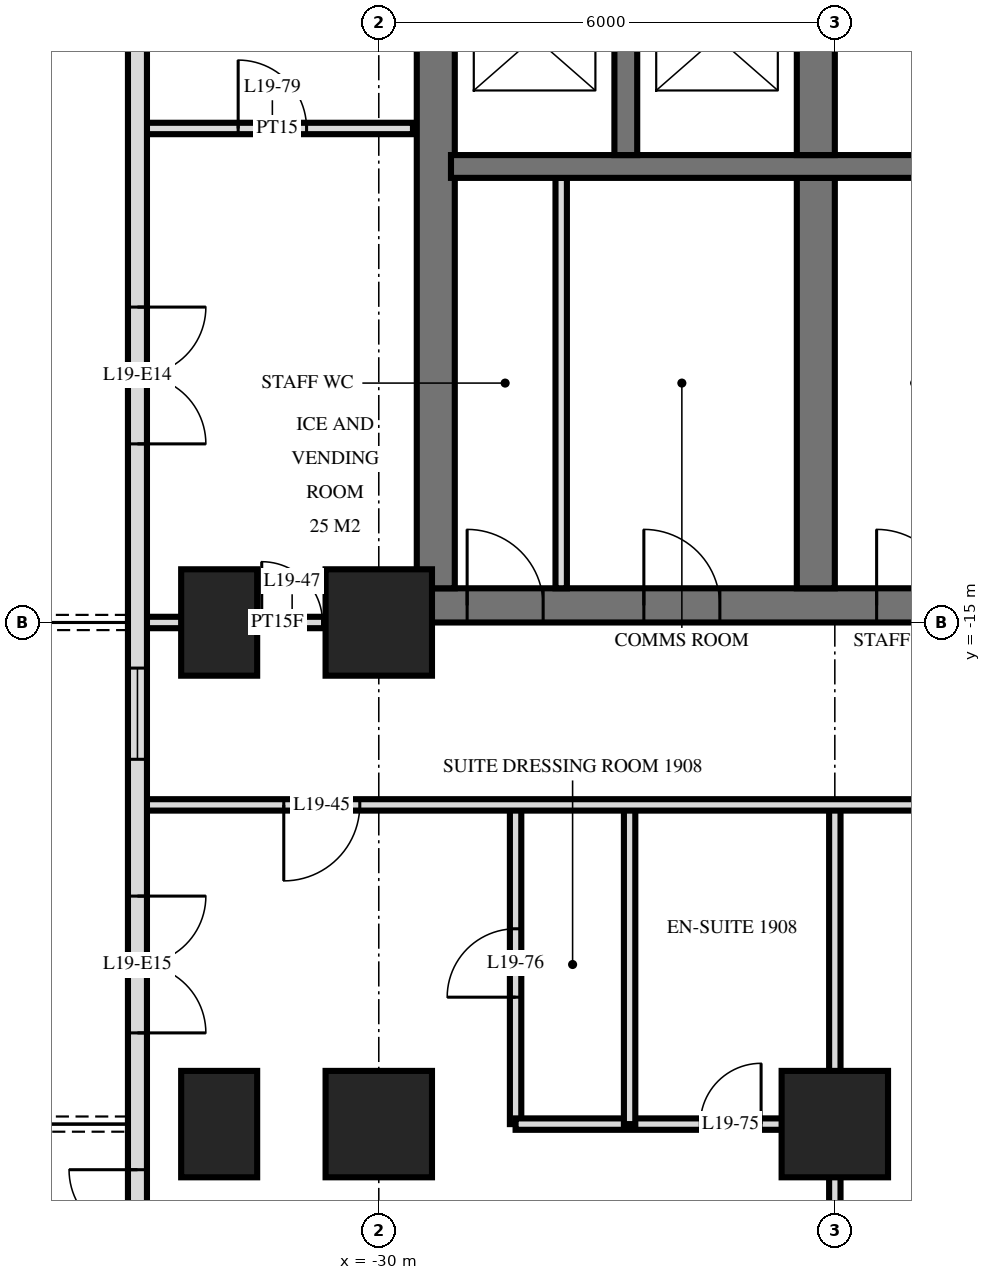
"""IFC4 building model, lengths in metres.
Left out: names, types, materials, properties, quantities, classifications, styles, units other than length and angle.
Written with IfcOpenShell. Run it as: python <this file> out.ifc"""

import sys

from ifc_helpers import new_model, si_unit, direction, frame, frame_2d, origin, origin_2d, place, context, subcontext, project, spatial, rectangle, extrude, element, fill, save


model = new_model("IFC4")
c1 = context("Model", 3, precision=1e-05, world=origin(), true_north=direction((0.0, 1.0)))
c2 = subcontext(c1, "Body", "Model", "MODEL_VIEW")
j1 = project(units=[si_unit("LENGTHUNIT", "METRE"), si_unit("PLANEANGLEUNIT", "RADIAN")], contexts=[c1])
p1 = place(None, origin())
s1 = spatial("IfcSite", under=j1, at=p1, CompositionType="ELEMENT")
p2 = place(p1, origin())
s2 = spatial("IfcBuilding", under=s1, at=p2, CompositionType="ELEMENT")
p3 = place(p2, frame((0.0, 0.0, 78.0)))
s3 = spatial("IfcBuildingStorey", under=s2, at=p3, CompositionType="ELEMENT", Elevation=78.0)
for number, where, z_axis, x_axis in (
    (1, (-32.1, -21.6, 0.0), (0.0, 0.0, 1.0), (0.0, 1.0, 0.0)),
    (2, (-32.1, -15.0, 0.0), (0.0, 0.0, 1.0), (0.0, 1.0, 0.0)),
):
    element("IfcColumn", number, at=place(p3, frame(where, z_axis=z_axis, x_axis=x_axis)), inside=s3, PredefinedType="COLUMN", context=c2, shape_type="SweptSolid", body=[
        extrude(rectangle(XDim=1.4, YDim=1.0, at=origin_2d()), origin(), (0.0, 0.0, 1.0), 3.6),
    ])
for number, where, z_axis, x_axis in (
    (3, (-30.0, -21.6, 0.0), (0.0, 0.0, 1.0), (1.0, 0.0, 0.0)),
    (4, (-30.0, -15.0, 0.0), (0.0, 0.0, 1.0), (1.0, 0.0, 0.0)),
    (5, (-24.0, -21.6, 0.0), (0.0, 0.0, 1.0), (1.0, 0.0, 0.0)),
):
    element("IfcColumn", number, at=place(p3, frame(where, z_axis=z_axis, x_axis=x_axis)), inside=s3, PredefinedType="COLUMN", context=c2, shape_type="SweptSolid", body=[
        extrude(rectangle(XDim=1.4, YDim=1.4, at=origin_2d()), origin(), (0.0, 0.0, 1.0), 3.6),
    ])
p4 = place(p3, frame((-29.5, -14.775, 0.0), z_axis=(0.0, 0.0, 1.0), x_axis=(1.0, 0.0, 0.0)))
e6 = element("IfcWall", 6, at=p4, inside=s3, PredefinedType="SHEAR", context=c2, shape_type="SweptSolid", body=[
    extrude(rectangle(XDim=19.5, YDim=0.45, at=frame_2d((9.75, 0.0))), origin(), (0.0, 0.0, 1.0), 3.6),
])
p5 = place(p4, frame((11.2, 0.0, 0.0)))
e7 = element("IfcOpeningElement", 7, at=p5, cuts=e6, PredefinedType="OPENING", context=c2, shape_type="SweptSolid", body=[
    extrude(rectangle(XDim=1.2, YDim=2.1, at=frame_2d((0.6, 1.05))), frame((0.0, 0.235, 0.0), z_axis=(0.0, -1.0, 0.0), x_axis=(1.0, 0.0, 0.0)), (0.0, 0.0, 1.0), 0.47),
])
p6 = place(p4, frame((14.25, 0.0, 0.0)))
e8 = element("IfcOpeningElement", 8, at=p6, cuts=e6, PredefinedType="OPENING", context=c2, shape_type="SweptSolid", body=[
    extrude(rectangle(XDim=1.1, YDim=2.1, at=frame_2d((0.55, 1.05))), frame((0.0, 0.235, 0.0), z_axis=(0.0, -1.0, 0.0), x_axis=(1.0, 0.0, 0.0)), (0.0, 0.0, 1.0), 0.47),
])
p7 = place(p4, frame((8.5, 0.0, 0.0)))
e9 = element("IfcOpeningElement", 9, at=p7, cuts=e6, PredefinedType="OPENING", context=c2, shape_type="SweptSolid", body=[
    extrude(rectangle(XDim=0.9, YDim=2.1, at=frame_2d((0.45, 1.05))), frame((0.0, 0.235, 0.0), z_axis=(0.0, -1.0, 0.0), x_axis=(1.0, 0.0, 0.0)), (0.0, 0.0, 1.0), 0.47),
])
p8 = place(p4, frame((6.05, 0.0, 0.0)))
e10 = element("IfcOpeningElement", 10, at=p8, cuts=e6, PredefinedType="OPENING", context=c2, shape_type="SweptSolid", body=[
    extrude(rectangle(XDim=1.0, YDim=2.1, at=frame_2d((0.5, 1.05))), frame((0.0, 0.235, 0.0), z_axis=(0.0, -1.0, 0.0), x_axis=(1.0, 0.0, 0.0)), (0.0, 0.0, 1.0), 0.47),
])
p9 = place(p4, frame((2.988, 0.0, 0.0)))
e11 = element("IfcOpeningElement", 11, at=p9, cuts=e6, PredefinedType="OPENING", context=c2, shape_type="SweptSolid", body=[
    extrude(rectangle(XDim=1.0, YDim=2.1, at=frame_2d((0.5, 1.05))), frame((0.0, 0.235, 0.0), z_axis=(0.0, -1.0, 0.0), x_axis=(1.0, 0.0, 0.0)), (0.0, 0.0, 1.0), 0.47),
])
p10 = place(p4, frame((0.663, 0.0, 0.0)))
e12 = element("IfcOpeningElement", 12, at=p10, cuts=e6, PredefinedType="OPENING", context=c2, shape_type="SweptSolid", body=[
    extrude(rectangle(XDim=1.0, YDim=2.1, at=frame_2d((0.5, 1.05))), frame((0.0, 0.235, 0.0), z_axis=(0.0, -1.0, 0.0), x_axis=(1.0, 0.0, 0.0)), (0.0, 0.0, 1.0), 0.47),
])
p11 = place(p3, frame((-29.25, -14.55, 0.0), z_axis=(0.0, 0.0, 1.0), x_axis=(0.0, 1.0, 0.0)))
e13 = element("IfcWall", 13, at=p11, inside=s3, PredefinedType="SHEAR", context=c2, shape_type="SweptSolid", body=[
    extrude(rectangle(XDim=14.1, YDim=0.5, at=frame_2d((7.05, 0.0))), origin(), (0.0, 0.0, 1.0), 3.6),
])
p12 = place(p3, frame((-29.05, -9.0, 0.0), z_axis=(0.0, 0.0, 1.0), x_axis=(1.0, 0.0, 0.0)))
e14 = element("IfcWall", 14, at=p12, inside=s3, PredefinedType="SHEAR", context=c2, shape_type="SweptSolid", body=[
    extrude(rectangle(XDim=18.7, YDim=0.3, at=frame_2d((9.35, 0.0))), origin(), (0.0, 0.0, 1.0), 3.6),
])
p13 = place(p12, frame((13.8, 0.0, 0.0)))
e15 = element("IfcOpeningElement", 15, at=p13, cuts=e14, PredefinedType="OPENING", context=c2, shape_type="SweptSolid", body=[
    extrude(rectangle(XDim=1.1, YDim=2.1, at=frame_2d((0.55, 1.05))), frame((0.0, 0.16, 0.0), z_axis=(0.0, -1.0, 0.0), x_axis=(1.0, 0.0, 0.0)), (0.0, 0.0, 1.0), 0.32),
])
p14 = place(p3, frame((-24.25, -8.85, 0.0), z_axis=(0.0, 0.0, 1.0), x_axis=(0.0, 1.0, 0.0)))
e16 = element("IfcWall", 16, at=p14, inside=s3, PredefinedType="SHEAR", context=c2, shape_type="SweptSolid", body=[
    extrude(rectangle(XDim=2.3, YDim=0.5, at=frame_2d((1.15, 0.0))), origin(), (0.0, 0.0, 1.0), 3.6),
])
p15 = place(p3, frame((-24.25, -14.55, 0.0), z_axis=(0.0, 0.0, 1.0), x_axis=(0.0, 1.0, 0.0)))
e17 = element("IfcWall", 17, at=p15, inside=s3, PredefinedType="SHEAR", context=c2, shape_type="SweptSolid", body=[
    extrude(rectangle(XDim=5.4, YDim=0.5, at=frame_2d((2.7, 0.0))), origin(), (0.0, 0.0, 1.0), 3.6),
])
p16 = place(p3, frame((-26.75, -8.85, 0.0), z_axis=(0.0, 0.0, 1.0), x_axis=(0.0, 1.0, 0.0)))
e18 = element("IfcWall", 18, at=p16, inside=s3, PredefinedType="SHEAR", context=c2, shape_type="SweptSolid", body=[
    extrude(rectangle(XDim=2.3, YDim=0.3, at=frame_2d((1.15, 0.0))), origin(), (0.0, 0.0, 1.0), 3.6),
])
p17 = place(p3, frame((-33.175, -3.325, 0.0), z_axis=(0.0, 0.0, 1.0), x_axis=(0.0, -1.0, 0.0)))
e19 = element("IfcWall", 19, at=p17, inside=s3, PredefinedType="SOLIDWALL", context=c2, shape_type="SweptSolid", body=[
    extrude(rectangle(XDim=21.551, YDim=0.25, at=frame_2d((10.775, 0.0))), origin(), (0.0, 0.0, 1.0), 3.32),
])
p18 = place(p17, frame((7.525, 0.0, 0.0)))
e20 = element("IfcOpeningElement", 20, at=p18, cuts=e19, PredefinedType="OPENING", context=c2, shape_type="SweptSolid", body=[
    extrude(rectangle(XDim=1.8, YDim=2.4, at=frame_2d((0.9, 1.2))), frame((0.0, 0.135, 0.0), z_axis=(0.0, -1.0, 0.0), x_axis=(1.0, 0.0, 0.0)), (0.0, 0.0, 1.0), 0.27),
])
p19 = place(p17, frame((12.275, 0.0, 0.3)))
e21 = element("IfcOpeningElement", 21, at=p19, cuts=e19, PredefinedType="OPENING", context=c2, shape_type="SweptSolid", body=[
    extrude(rectangle(XDim=1.2, YDim=2.1, at=frame_2d((0.6, 1.05))), frame((0.0, 0.135, 0.0), z_axis=(0.0, -1.0, 0.0), x_axis=(1.0, 0.0, 0.0)), (0.0, 0.0, 1.0), 0.27),
])
p20 = place(p17, frame((15.275, 0.0, 0.0)))
e22 = element("IfcOpeningElement", 22, at=p20, cuts=e19, PredefinedType="OPENING", context=c2, shape_type="SweptSolid", body=[
    extrude(rectangle(XDim=1.8, YDim=2.4, at=frame_2d((0.9, 1.2))), frame((0.0, 0.135, 0.0), z_axis=(0.0, -1.0, 0.0), x_axis=(1.0, 0.0, 0.0)), (0.0, 0.0, 1.0), 0.27),
])
p21 = place(p17, frame((18.875, 0.0, 0.0)))
e23 = element("IfcOpeningElement", 23, at=p21, cuts=e19, PredefinedType="OPENING", context=c2, shape_type="SweptSolid", body=[
    extrude(rectangle(XDim=1.8, YDim=2.4, at=frame_2d((0.9, 1.2))), frame((0.0, 0.135, 0.0), z_axis=(0.0, -1.0, 0.0), x_axis=(1.0, 0.0, 0.0)), (0.0, 0.0, 1.0), 0.27),
])
p22 = place(p3, frame((-27.6, -14.55, 0.0), z_axis=(0.0, 0.0, 1.0), x_axis=(0.0, 1.0, 0.0)))
e24 = element("IfcWall", 24, at=p22, inside=s3, PredefinedType="PARTITIONING", context=c2, shape_type="SweptSolid", body=[
    extrude(rectangle(XDim=5.4, YDim=0.15, at=frame_2d((2.7, 0.0))), origin(), (0.0, 0.0, 1.0), 3.3),
])
p23 = place(p3, frame((-24.0, -29.22, 0.0), z_axis=(0.0, 0.0, 1.0), x_axis=(0.0, 1.0, 0.0)))
e25 = element("IfcWall", 25, at=p23, inside=s3, PredefinedType="PARTITIONING", context=c2, shape_type="SweptSolid", body=[
    extrude(rectangle(XDim=11.82, YDim=0.15, at=frame_2d((5.91, 0.0))), origin(), (0.0, 0.0, 1.0), 3.32),
])
p24 = place(p3, frame((-26.7, -21.6, 0.0), z_axis=(0.0, 0.0, 1.0), x_axis=(0.0, 1.0, 0.0)))
e26 = element("IfcWall", 26, at=p24, inside=s3, PredefinedType="PARTITIONING", context=c2, shape_type="SweptSolid", body=[
    extrude(rectangle(XDim=4.2, YDim=0.15, at=frame_2d((2.1, 0.0))), origin(), (0.0, 0.0, 1.0), 3.32),
])
p25 = place(p3, frame((-28.2, -21.6, 0.0), z_axis=(0.0, 0.0, 1.0), x_axis=(0.0, 1.0, 0.0)))
e27 = element("IfcWall", 27, at=p25, inside=s3, PredefinedType="PARTITIONING", context=c2, shape_type="SweptSolid", body=[
    extrude(rectangle(XDim=4.2, YDim=0.15, at=frame_2d((2.1, 0.0))), origin(), (0.0, 0.0, 1.0), 3.32),
])
p26 = place(p25, frame((1.67, 0.0, 0.0)))
e28 = element("IfcOpeningElement", 28, at=p26, cuts=e27, PredefinedType="OPENING", context=c2, shape_type="SweptSolid", body=[
    extrude(rectangle(XDim=0.9, YDim=2.1, at=frame_2d((0.45, 1.05))), frame((0.0, 0.085, 0.0), z_axis=(0.0, -1.0, 0.0), x_axis=(1.0, 0.0, 0.0)), (0.0, 0.0, 1.0), 0.17),
])
p27 = place(p3, frame((-28.2, -21.6, 0.0), z_axis=(0.0, 0.0, 1.0), x_axis=(1.0, 0.0, 0.0)))
e29 = element("IfcWall", 29, at=p27, inside=s3, PredefinedType="PARTITIONING", context=c2, shape_type="SweptSolid", body=[
    extrude(rectangle(XDim=4.2, YDim=0.15, at=frame_2d((2.1, 0.0))), origin(), (0.0, 0.0, 1.0), 3.32),
])
p28 = place(p27, frame((2.43, 0.0, 0.0)))
e30 = element("IfcOpeningElement", 30, at=p28, cuts=e29, PredefinedType="OPENING", context=c2, shape_type="SweptSolid", body=[
    extrude(rectangle(XDim=0.8, YDim=2.1, at=frame_2d((0.4, 1.05))), frame((0.0, 0.085, 0.0), z_axis=(0.0, -1.0, 0.0), x_axis=(1.0, 0.0, 0.0)), (0.0, 0.0, 1.0), 0.17),
])
p29 = place(p3, frame((-33.12, -17.4, 0.0), z_axis=(0.0, 0.0, 1.0), x_axis=(1.0, 0.0, 0.0)))
e31 = element("IfcWall", 31, at=p29, inside=s3, PredefinedType="PARTITIONING", context=c2, shape_type="SweptSolid", body=[
    extrude(rectangle(XDim=66.24, YDim=0.15, at=frame_2d((33.12, 0.0))), origin(), (0.0, 0.0, 1.0), 3.32),
])
p30 = place(p29, frame((10.27, 0.0, 0.0)))
e32 = element("IfcOpeningElement", 32, at=p30, cuts=e31, PredefinedType="OPENING", context=c2, shape_type="SweptSolid", body=[
    extrude(rectangle(XDim=1.0, YDim=2.1, at=frame_2d((0.5, 1.05))), frame((0.0, 0.085, 0.0), z_axis=(0.0, -1.0, 0.0), x_axis=(1.0, 0.0, 0.0)), (0.0, 0.0, 1.0), 0.17),
])
p31 = place(p29, frame((16.97, 0.0, 0.0)))
e33 = element("IfcOpeningElement", 33, at=p31, cuts=e31, PredefinedType="OPENING", context=c2, shape_type="SweptSolid", body=[
    extrude(rectangle(XDim=1.0, YDim=2.1, at=frame_2d((0.5, 1.05))), frame((0.0, 0.085, 0.0), z_axis=(0.0, -1.0, 0.0), x_axis=(1.0, 0.0, 0.0)), (0.0, 0.0, 1.0), 0.17),
])
p32 = place(p29, frame((28.42, 0.0, 0.0)))
e34 = element("IfcOpeningElement", 34, at=p32, cuts=e31, PredefinedType="OPENING", context=c2, shape_type="SweptSolid", body=[
    extrude(rectangle(XDim=1.0, YDim=2.1, at=frame_2d((0.5, 1.05))), frame((0.0, 0.085, 0.0), z_axis=(0.0, -1.0, 0.0), x_axis=(1.0, 0.0, 0.0)), (0.0, 0.0, 1.0), 0.17),
])
p33 = place(p29, frame((30.82, 0.0, 0.0)))
e35 = element("IfcOpeningElement", 35, at=p33, cuts=e31, PredefinedType="OPENING", context=c2, shape_type="SweptSolid", body=[
    extrude(rectangle(XDim=1.0, YDim=2.1, at=frame_2d((0.5, 1.05))), frame((0.0, 0.085, 0.0), z_axis=(0.0, -1.0, 0.0), x_axis=(1.0, 0.0, 0.0)), (0.0, 0.0, 1.0), 0.17),
])
p34 = place(p29, frame((39.27, 0.0, 0.0)))
e36 = element("IfcOpeningElement", 36, at=p34, cuts=e31, PredefinedType="OPENING", context=c2, shape_type="SweptSolid", body=[
    extrude(rectangle(XDim=1.0, YDim=2.1, at=frame_2d((0.5, 1.05))), frame((0.0, 0.085, 0.0), z_axis=(0.0, -1.0, 0.0), x_axis=(1.0, 0.0, 0.0)), (0.0, 0.0, 1.0), 0.17),
])
p35 = place(p29, frame((45.22, 0.0, 0.0)))
e37 = element("IfcOpeningElement", 37, at=p35, cuts=e31, PredefinedType="OPENING", context=c2, shape_type="SweptSolid", body=[
    extrude(rectangle(XDim=1.0, YDim=2.1, at=frame_2d((0.5, 1.05))), frame((0.0, 0.085, 0.0), z_axis=(0.0, -1.0, 0.0), x_axis=(1.0, 0.0, 0.0)), (0.0, 0.0, 1.0), 0.17),
])
p36 = place(p29, frame((48.27, 0.0, 0.0)))
e38 = element("IfcOpeningElement", 38, at=p36, cuts=e31, PredefinedType="OPENING", context=c2, shape_type="SweptSolid", body=[
    extrude(rectangle(XDim=1.0, YDim=2.1, at=frame_2d((0.5, 1.05))), frame((0.0, 0.085, 0.0), z_axis=(0.0, -1.0, 0.0), x_axis=(1.0, 0.0, 0.0)), (0.0, 0.0, 1.0), 0.17),
])
p37 = place(p29, frame((1.87, 0.0, 0.0)))
e39 = element("IfcOpeningElement", 39, at=p37, cuts=e31, PredefinedType="OPENING", context=c2, shape_type="SweptSolid", body=[
    extrude(rectangle(XDim=1.0, YDim=2.1, at=frame_2d((0.5, 1.05))), frame((0.0, 0.085, 0.0), z_axis=(0.0, -1.0, 0.0), x_axis=(1.0, 0.0, 0.0)), (0.0, 0.0, 1.0), 0.17),
])
p38 = place(p29, frame((60.37, 0.0, 0.0)))
e40 = element("IfcOpeningElement", 40, at=p38, cuts=e31, PredefinedType="OPENING", context=c2, shape_type="SweptSolid", body=[
    extrude(rectangle(XDim=1.0, YDim=2.1, at=frame_2d((0.5, 1.05))), frame((0.0, 0.085, 0.0), z_axis=(0.0, -1.0, 0.0), x_axis=(1.0, 0.0, 0.0)), (0.0, 0.0, 1.0), 0.17),
])
p39 = place(p3, frame((-33.12, -15.0, 0.0), z_axis=(0.0, 0.0, 1.0), x_axis=(1.0, 0.0, 0.0)))
e41 = element("IfcWall", 41, at=p39, inside=s3, PredefinedType="PARTITIONING", context=c2, shape_type="SweptSolid", body=[
    extrude(rectangle(XDim=3.57, YDim=0.15, at=frame_2d((1.785, 0.0))), origin(), (0.0, 0.0, 1.0), 3.32),
])
p40 = place(p39, frame((1.58, 0.0, 0.0)))
e42 = element("IfcOpeningElement", 42, at=p40, cuts=e41, PredefinedType="OPENING", context=c2, shape_type="SweptSolid", body=[
    extrude(rectangle(XDim=0.8, YDim=2.1, at=frame_2d((0.4, 1.05))), frame((0.0, 0.085, 0.0), z_axis=(0.0, -1.0, 0.0), x_axis=(1.0, 0.0, 0.0)), (0.0, 0.0, 1.0), 0.17),
])
p41 = place(p3, frame((-33.12, -8.5, 0.0), z_axis=(0.0, 0.0, 1.0), x_axis=(1.0, 0.0, 0.0)))
e43 = element("IfcWall", 43, at=p41, inside=s3, PredefinedType="PARTITIONING", context=c2, shape_type="SweptSolid", body=[
    extrude(rectangle(XDim=3.57, YDim=0.15, at=frame_2d((1.785, 0.0))), origin(), (0.0, 0.0, 1.0), 3.32),
])
p42 = place(p41, frame((1.27, 0.0, 0.0)))
e44 = element("IfcOpeningElement", 44, at=p42, cuts=e43, PredefinedType="OPENING", context=c2, shape_type="SweptSolid", body=[
    extrude(rectangle(XDim=0.9, YDim=2.1, at=frame_2d((0.45, 1.05))), frame((0.0, 0.085, 0.0), z_axis=(0.0, -1.0, 0.0), x_axis=(1.0, 0.0, 0.0)), (0.0, 0.0, 1.0), 0.17),
])
p43 = place(p18, origin())
e45 = element("IfcDoor", 45, at=p43, inside=s3, OperationType="DOUBLE_DOOR_SINGLE_SWING", PredefinedType="DOOR", context=c2, shape_type="SweptSolid", body=[
    extrude(rectangle(XDim=1.8, YDim=2.4, at=frame_2d((0.9, 1.2))), frame((0.0, 0.025, 0.0), z_axis=(0.0, -1.0, 0.0), x_axis=(1.0, 0.0, 0.0)), (0.0, 0.0, 1.0), 0.05),
])
fill(e20, e45)
p44 = place(p19, origin())
e46 = element("IfcWindow", 46, at=p44, inside=s3, PartitioningType="SINGLE_PANEL", PredefinedType="WINDOW", context=c2, shape_type="SweptSolid", body=[
    extrude(rectangle(XDim=1.2, YDim=2.1, at=frame_2d((0.6, 1.05))), frame((0.0, 0.03, 0.0), z_axis=(0.0, -1.0, 0.0), x_axis=(1.0, 0.0, 0.0)), (0.0, 0.0, 1.0), 0.06),
])
fill(e21, e46)
p45 = place(p20, origin())
e47 = element("IfcDoor", 47, at=p45, inside=s3, OperationType="DOUBLE_DOOR_SINGLE_SWING", PredefinedType="DOOR", context=c2, shape_type="SweptSolid", body=[
    extrude(rectangle(XDim=1.8, YDim=2.4, at=frame_2d((0.9, 1.2))), frame((0.0, 0.025, 0.0), z_axis=(0.0, -1.0, 0.0), x_axis=(1.0, 0.0, 0.0)), (0.0, 0.0, 1.0), 0.05),
])
fill(e22, e47)
p46 = place(p21, frame((0.9, 0.0, 0.0), z_axis=(0.0, 0.0, 1.0), x_axis=(-1.0, 0.0, 0.0)))
e48 = element("IfcDoor", 48, at=p46, inside=s3, OperationType="DOUBLE_DOOR_SINGLE_SWING", PredefinedType="DOOR", context=c2, shape_type="SweptSolid", body=[
    extrude(rectangle(XDim=1.8, YDim=2.4, at=frame_2d((0.0, 1.2))), frame((0.0, -0.025, 0.0), z_axis=(0.0, 1.0, 0.0), x_axis=(-1.0, 0.0, 0.0)), (0.0, 0.0, 1.0), 0.05),
])
fill(e23, e48)
p47 = place(p8, origin())
e49 = element("IfcDoor", 49, at=p47, inside=s3, OperationType="SINGLE_SWING_RIGHT", PredefinedType="DOOR", context=c2, shape_type="SweptSolid", body=[
    extrude(rectangle(XDim=1.0, YDim=2.1, at=frame_2d((0.5, 1.05))), frame((0.0, 0.025, 0.0), z_axis=(0.0, -1.0, 0.0), x_axis=(1.0, 0.0, 0.0)), (0.0, 0.0, 1.0), 0.05),
])
fill(e10, e49)
p48 = place(p9, origin())
e50 = element("IfcDoor", 50, at=p48, inside=s3, OperationType="SINGLE_SWING_RIGHT", PredefinedType="DOOR", context=c2, shape_type="SweptSolid", body=[
    extrude(rectangle(XDim=1.0, YDim=2.1, at=frame_2d((0.5, 1.05))), frame((0.0, 0.025, 0.0), z_axis=(0.0, -1.0, 0.0), x_axis=(1.0, 0.0, 0.0)), (0.0, 0.0, 1.0), 0.05),
])
fill(e11, e50)
p49 = place(p10, origin())
e51 = element("IfcDoor", 51, at=p49, inside=s3, OperationType="SINGLE_SWING_RIGHT", PredefinedType="DOOR", context=c2, shape_type="SweptSolid", body=[
    extrude(rectangle(XDim=1.0, YDim=2.1, at=frame_2d((0.5, 1.05))), frame((0.0, 0.025, 0.0), z_axis=(0.0, -1.0, 0.0), x_axis=(1.0, 0.0, 0.0)), (0.0, 0.0, 1.0), 0.05),
])
fill(e12, e51)
p50 = place(p37, frame((0.5, 0.0, 0.0), z_axis=(0.0, 0.0, 1.0), x_axis=(-1.0, 0.0, 0.0)))
e52 = element("IfcDoor", 52, at=p50, inside=s3, OperationType="SINGLE_SWING_LEFT", PredefinedType="DOOR", context=c2, shape_type="SweptSolid", body=[
    extrude(rectangle(XDim=1.0, YDim=2.1, at=frame_2d((0.0, 1.05))), frame((0.0, -0.025, 0.0), z_axis=(0.0, 1.0, 0.0), x_axis=(-1.0, 0.0, 0.0)), (0.0, 0.0, 1.0), 0.05),
])
fill(e39, e52)
p51 = place(p40, origin())
e53 = element("IfcDoor", 53, at=p51, inside=s3, OperationType="SINGLE_SWING_RIGHT", PredefinedType="DOOR", context=c2, shape_type="SweptSolid", body=[
    extrude(rectangle(XDim=0.8, YDim=2.1, at=frame_2d((0.4, 1.05))), frame((0.0, 0.025, 0.0), z_axis=(0.0, -1.0, 0.0), x_axis=(1.0, 0.0, 0.0)), (0.0, 0.0, 1.0), 0.05),
])
fill(e42, e53)
p52 = place(p28, origin())
e54 = element("IfcDoor", 54, at=p52, inside=s3, OperationType="SINGLE_SWING_LEFT", PredefinedType="DOOR", context=c2, shape_type="SweptSolid", body=[
    extrude(rectangle(XDim=0.8, YDim=2.1, at=frame_2d((0.4, 1.05))), frame((0.0, 0.025, 0.0), z_axis=(0.0, -1.0, 0.0), x_axis=(1.0, 0.0, 0.0)), (0.0, 0.0, 1.0), 0.05),
])
fill(e30, e54)
p53 = place(p26, origin())
e55 = element("IfcDoor", 55, at=p53, inside=s3, OperationType="SINGLE_SWING_RIGHT", PredefinedType="DOOR", context=c2, shape_type="SweptSolid", body=[
    extrude(rectangle(XDim=0.9, YDim=2.1, at=frame_2d((0.45, 1.05))), frame((0.0, 0.025, 0.0), z_axis=(0.0, -1.0, 0.0), x_axis=(1.0, 0.0, 0.0)), (0.0, 0.0, 1.0), 0.05),
])
fill(e28, e55)
p54 = place(p42, origin())
e56 = element("IfcDoor", 56, at=p54, inside=s3, OperationType="SINGLE_SWING_RIGHT", PredefinedType="DOOR", context=c2, shape_type="SweptSolid", body=[
    extrude(rectangle(XDim=0.9, YDim=2.1, at=frame_2d((0.45, 1.05))), frame((0.0, 0.025, 0.0), z_axis=(0.0, -1.0, 0.0), x_axis=(1.0, 0.0, 0.0)), (0.0, 0.0, 1.0), 0.05),
])
fill(e44, e56)
save(model, sys.argv[1])
